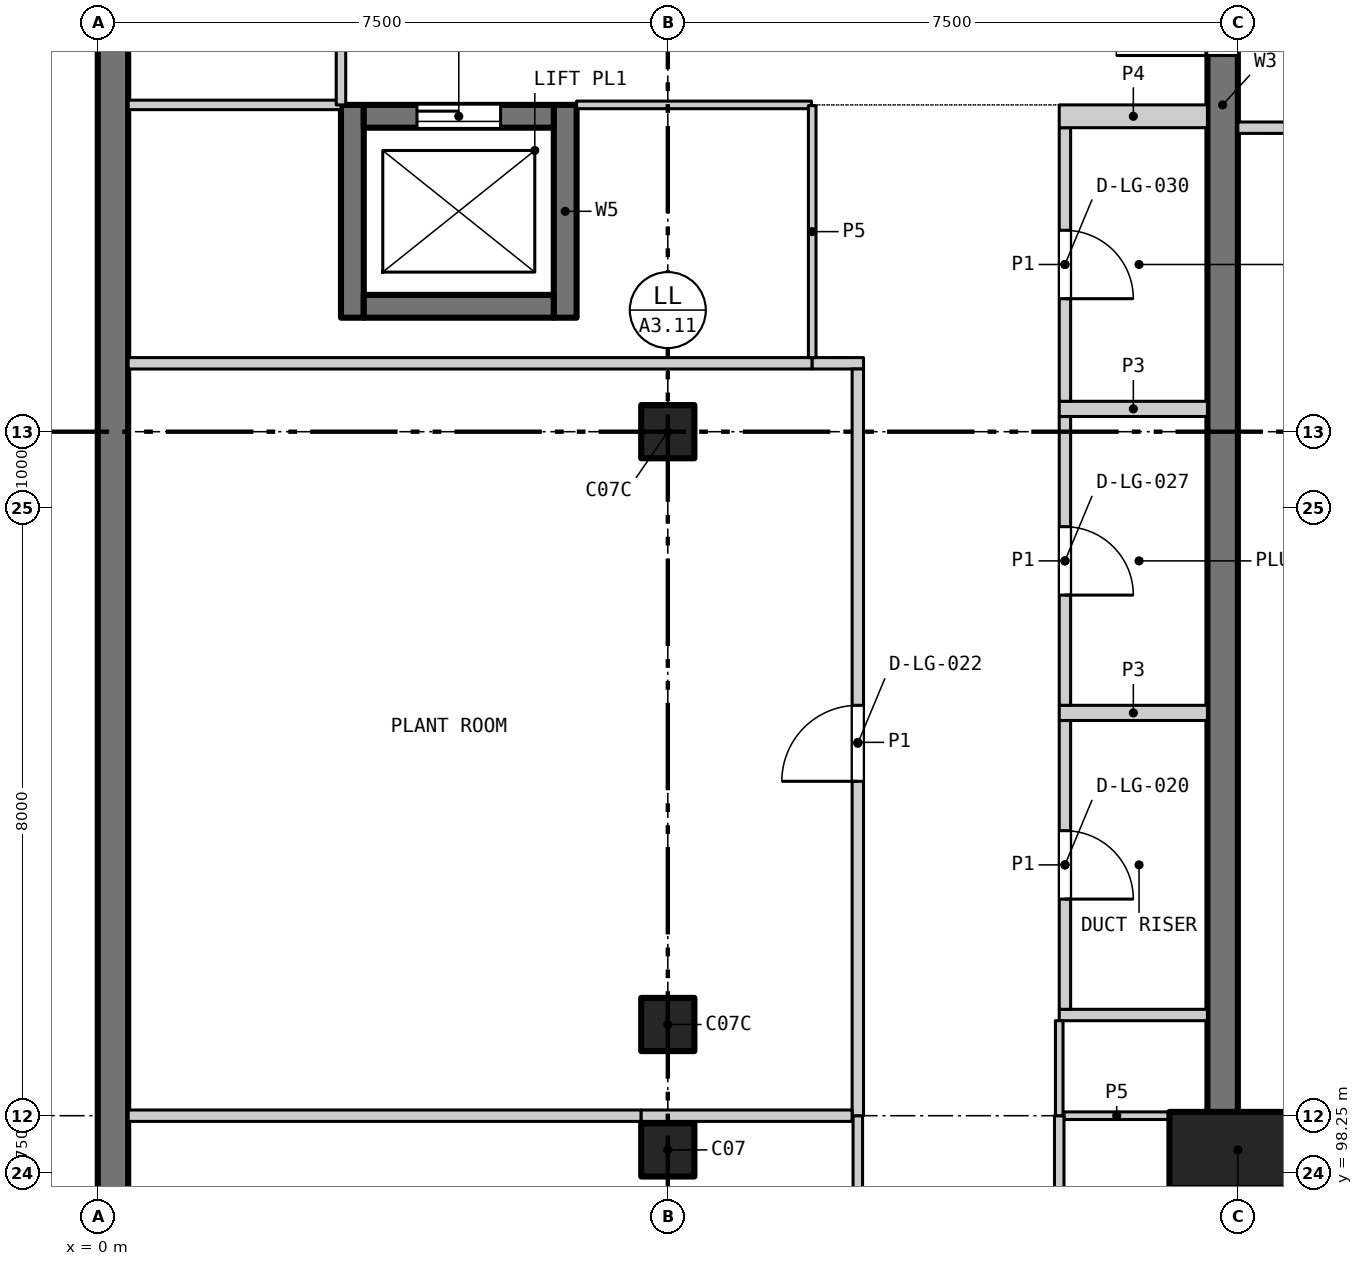
"""IFC4 building model, lengths in metres.
Left out: names, types, materials, properties, quantities, classifications, styles, units other than length and angle.
Written with IfcOpenShell. Run it as: python <this file> out.ifc"""

import sys

from ifc_helpers import new_model, si_unit, direction, frame, frame_2d, origin, origin_2d, place, context, subcontext, project, spatial, rectangle, extrude, element, fill, save


model = new_model("IFC4")
c1 = context("Model", 3, precision=1e-05, world=origin(), true_north=direction((0.0, 1.0)))
c2 = subcontext(c1, "Body", "Model", "MODEL_VIEW")
j1 = project(units=[si_unit("LENGTHUNIT", "METRE"), si_unit("PLANEANGLEUNIT", "RADIAN")], contexts=[c1])
p1 = place(None, origin())
s1 = spatial("IfcSite", under=j1, at=p1, CompositionType="ELEMENT")
p2 = place(p1, origin())
s2 = spatial("IfcBuilding", under=s1, at=p2, CompositionType="ELEMENT")
p3 = place(p2, frame((0.0, 0.0, -5.0)))
s3 = spatial("IfcBuildingStorey", under=s2, at=p3, CompositionType="ELEMENT", Elevation=-5.0)
for number, where, z_axis, x_axis in (
    (1, (7.5, 98.55, 0.0), (0.0, 0.0, 1.0), (1.0, 0.0, 0.0)),
    (2, (7.5, 100.2, 0.0), (0.0, 0.0, 1.0), (1.0, 0.0, 0.0)),
    (3, (7.5, 108.0, 0.0), (0.0, 0.0, 1.0), (1.0, 0.0, 0.0)),
):
    element("IfcColumn", number, at=place(p3, frame(where, z_axis=z_axis, x_axis=x_axis)), inside=s3, PredefinedType="COLUMN", context=c2, shape_type="SweptSolid", body=[
        extrude(rectangle(XDim=0.7, YDim=0.7, at=origin_2d()), origin(), (0.0, 0.0, 1.0), 5.0),
    ])
p4 = place(p3, frame((0.2, 18.0, 0.0), z_axis=(0.0, 0.0, 1.0), x_axis=(0.0, 1.0, 0.0)))
e4 = element("IfcWall", 4, at=p4, inside=s3, PredefinedType="SOLIDWALL", context=c2, shape_type="SweptSolid", body=[
    extrude(rectangle(XDim=108.0, YDim=0.4, at=frame_2d((54.0, 0.0))), origin(), (0.0, 0.0, 1.0), 5.0),
])
p5 = place(p3, frame((14.8, 99.0, 0.0), z_axis=(0.0, 0.0, 1.0), x_axis=(0.0, 1.0, 0.0)))
e5 = element("IfcWall", 5, at=p5, inside=s3, PredefinedType="SHEAR", context=c2, shape_type="SweptSolid", body=[
    extrude(rectangle(XDim=26.6, YDim=0.4, at=frame_2d((13.3, 0.0))), origin(), (0.0, 0.0, 1.0), 5.0),
])
p6 = place(p5, frame((13.95, 0.0, 0.0)))
e6 = element("IfcOpeningElement", 6, at=p6, cuts=e5, PredefinedType="OPENING", context=c2, shape_type="SweptSolid", body=[
    extrude(rectangle(XDim=1.4, YDim=2.4, at=frame_2d((0.7, 1.2))), frame((0.0, 0.21, 0.0), z_axis=(0.0, -1.0, 0.0), x_axis=(1.0, 0.0, 0.0)), (0.0, 0.0, 1.0), 0.42),
])
for number, where, z_axis, x_axis in (
    (7, (3.35, 109.5, 0.0), (0.0, 0.0, 1.0), (0.0, 1.0, 0.0)),
    (8, (6.15, 109.5, 0.0), (0.0, 0.0, 1.0), (0.0, 1.0, 0.0)),
):
    element("IfcWall", number, at=place(p3, frame(where, z_axis=z_axis, x_axis=x_axis)), inside=s3, PredefinedType="SHEAR", context=c2, shape_type="SweptSolid", body=[
        extrude(rectangle(XDim=2.8, YDim=0.3, at=frame_2d((1.4, 0.0))), origin(), (0.0, 0.0, 1.0), 5.0),
    ])
p7 = place(p3, frame((3.5, 109.65, 0.0), z_axis=(0.0, 0.0, 1.0), x_axis=(1.0, 0.0, 0.0)))
e9 = element("IfcWall", 9, at=p7, inside=s3, PredefinedType="SHEAR", context=c2, shape_type="SweptSolid", body=[
    extrude(rectangle(XDim=2.5, YDim=0.3, at=frame_2d((1.25, 0.0))), origin(), (0.0, 0.0, 1.0), 5.0),
])
p8 = place(p3, frame((3.5, 112.15, 0.0), z_axis=(0.0, 0.0, 1.0), x_axis=(1.0, 0.0, 0.0)))
e10 = element("IfcWall", 10, at=p8, inside=s3, PredefinedType="SHEAR", context=c2, shape_type="SweptSolid", body=[
    extrude(rectangle(XDim=2.5, YDim=0.3, at=frame_2d((1.25, 0.0))), origin(), (0.0, 0.0, 1.0), 5.0),
])
p9 = place(p8, frame((0.7, 0.0, 0.0)))
e11 = element("IfcOpeningElement", 11, at=p9, cuts=e10, PredefinedType="OPENING", context=c2, shape_type="SweptSolid", body=[
    extrude(rectangle(XDim=1.1, YDim=2.1, at=frame_2d((0.55, 1.05))), frame((0.0, 0.16, 0.0), z_axis=(0.0, -1.0, 0.0), x_axis=(1.0, 0.0, 0.0)), (0.0, 0.0, 1.0), 0.32),
])
p10 = place(p3, frame((15.0, 98.55, 0.0), z_axis=(0.0, 0.0, 1.0), x_axis=(1.0, 0.0, 0.0)))
e12 = element("IfcColumn", 12, at=p10, inside=s3, PredefinedType="COLUMN", context=c2, shape_type="SweptSolid", body=[
    extrude(rectangle(XDim=1.8, YDim=1.0, at=origin_2d()), origin(), (0.0, 0.0, 1.0), 5.0),
])
p11 = place(p3, frame((12.65, 100.325, 0.0), z_axis=(0.0, 0.0, 1.0), x_axis=(1.0, 0.0, 0.0)))
e13 = element("IfcWall", 13, at=p11, inside=s3, PredefinedType="PARTITIONING", context=c2, shape_type="SweptSolid", body=[
    extrude(rectangle(XDim=1.95, YDim=0.15, at=frame_2d((0.975, 0.0))), origin(), (0.0, 0.0, 1.0), 4.7),
])
p12 = place(p3, frame((12.725, 100.4, 0.0), z_axis=(0.0, 0.0, 1.0), x_axis=(0.0, 1.0, 0.0)))
e14 = element("IfcWall", 14, at=p12, inside=s3, PredefinedType="PARTITIONING", context=c2, shape_type="SweptSolid", body=[
    extrude(rectangle(XDim=3.8, YDim=0.15, at=frame_2d((1.9, 0.0))), origin(), (0.0, 0.0, 1.0), 4.7),
])
p13 = place(p12, frame((1.45, 0.0, 0.0)))
e15 = element("IfcOpeningElement", 15, at=p13, cuts=e14, PredefinedType="OPENING", context=c2, shape_type="SweptSolid", body=[
    extrude(rectangle(XDim=0.9, YDim=2.1, at=frame_2d((0.45, 1.05))), frame((0.0, 0.085, 0.0), z_axis=(0.0, -1.0, 0.0), x_axis=(1.0, 0.0, 0.0)), (0.0, 0.0, 1.0), 0.17),
])
p14 = place(p3, frame((12.65, 104.3, 0.0), z_axis=(0.0, 0.0, 1.0), x_axis=(1.0, 0.0, 0.0)))
e16 = element("IfcWall", 16, at=p14, inside=s3, PredefinedType="PARTITIONING", context=c2, shape_type="SweptSolid", body=[
    extrude(rectangle(XDim=1.95, YDim=0.2, at=frame_2d((0.975, 0.0))), origin(), (0.0, 0.0, 1.0), 4.7),
])
p15 = place(p3, frame((12.725, 104.4, 0.0), z_axis=(0.0, 0.0, 1.0), x_axis=(0.0, 1.0, 0.0)))
e17 = element("IfcWall", 17, at=p15, inside=s3, PredefinedType="PARTITIONING", context=c2, shape_type="SweptSolid", body=[
    extrude(rectangle(XDim=3.8, YDim=0.15, at=frame_2d((1.9, 0.0))), origin(), (0.0, 0.0, 1.0), 4.7),
])
p16 = place(p15, frame((1.45, 0.0, 0.0)))
e18 = element("IfcOpeningElement", 18, at=p16, cuts=e17, PredefinedType="OPENING", context=c2, shape_type="SweptSolid", body=[
    extrude(rectangle(XDim=0.9, YDim=2.1, at=frame_2d((0.45, 1.05))), frame((0.0, 0.085, 0.0), z_axis=(0.0, -1.0, 0.0), x_axis=(1.0, 0.0, 0.0)), (0.0, 0.0, 1.0), 0.17),
])
p17 = place(p3, frame((12.65, 108.3, 0.0), z_axis=(0.0, 0.0, 1.0), x_axis=(1.0, 0.0, 0.0)))
e19 = element("IfcWall", 19, at=p17, inside=s3, PredefinedType="PARTITIONING", context=c2, shape_type="SweptSolid", body=[
    extrude(rectangle(XDim=1.95, YDim=0.2, at=frame_2d((0.975, 0.0))), origin(), (0.0, 0.0, 1.0), 4.7),
])
p18 = place(p3, frame((12.725, 108.4, 0.0), z_axis=(0.0, 0.0, 1.0), x_axis=(0.0, 1.0, 0.0)))
e20 = element("IfcWall", 20, at=p18, inside=s3, PredefinedType="PARTITIONING", context=c2, shape_type="SweptSolid", body=[
    extrude(rectangle(XDim=3.6, YDim=0.15, at=frame_2d((1.8, 0.0))), origin(), (0.0, 0.0, 1.0), 4.7),
])
p19 = place(p18, frame((1.35, 0.0, 0.0)))
e21 = element("IfcOpeningElement", 21, at=p19, cuts=e20, PredefinedType="OPENING", context=c2, shape_type="SweptSolid", body=[
    extrude(rectangle(XDim=0.9, YDim=2.1, at=frame_2d((0.45, 1.05))), frame((0.0, 0.085, 0.0), z_axis=(0.0, -1.0, 0.0), x_axis=(1.0, 0.0, 0.0)), (0.0, 0.0, 1.0), 0.17),
])
p20 = place(p3, frame((12.65, 112.15, 0.0), z_axis=(0.0, 0.0, 1.0), x_axis=(1.0, 0.0, 0.0)))
e22 = element("IfcWall", 22, at=p20, inside=s3, PredefinedType="PARTITIONING", context=c2, shape_type="SweptSolid", body=[
    extrude(rectangle(XDim=1.95, YDim=0.3, at=frame_2d((0.975, 0.0))), origin(), (0.0, 0.0, 1.0), 4.7),
])
p21 = place(p3, frame((0.4, 99.0, 0.0), z_axis=(0.0, 0.0, 1.0), x_axis=(1.0, 0.0, 0.0)))
e23 = element("IfcWall", 23, at=p21, inside=s3, PredefinedType="PARTITIONING", context=c2, shape_type="SweptSolid", body=[
    extrude(rectangle(XDim=6.75, YDim=0.15, at=frame_2d((3.375, 0.0))), origin(), (0.0, 0.0, 1.0), 4.1),
])
p22 = place(p3, frame((12.712, 99.0, 0.0), z_axis=(0.0, 0.0, 1.0), x_axis=(1.0, 0.0, 0.0)))
e24 = element("IfcWall", 24, at=p22, inside=s3, PredefinedType="PARTITIONING", context=c2, shape_type="SweptSolid", body=[
    extrude(rectangle(XDim=1.388, YDim=0.1, at=frame_2d((0.694, 0.0))), origin(), (0.0, 0.0, 1.0), 4.65),
])
p23 = place(p3, frame((0.4, 108.9, 0.0), z_axis=(0.0, 0.0, 1.0), x_axis=(1.0, 0.0, 0.0)))
e25 = element("IfcWall", 25, at=p23, inside=s3, PredefinedType="PARTITIONING", context=c2, shape_type="SweptSolid", body=[
    extrude(rectangle(XDim=9.0, YDim=0.15, at=frame_2d((4.5, 0.0))), origin(), (0.0, 0.0, 1.0), 4.7),
])
p24 = place(p3, frame((9.4, 108.9, 0.0), z_axis=(0.0, 0.0, 1.0), x_axis=(1.0, 0.0, 0.0)))
e26 = element("IfcWall", 26, at=p24, inside=s3, PredefinedType="PARTITIONING", context=c2, shape_type="SweptSolid", body=[
    extrude(rectangle(XDim=0.675, YDim=0.15, at=frame_2d((0.337, 0.0))), origin(), (0.0, 0.0, 1.0), 4.7),
])
p25 = place(p3, frame((15.0, 112.0, 0.0), z_axis=(0.0, 0.0, 1.0), x_axis=(1.0, 0.0, 0.0)))
e27 = element("IfcWall", 27, at=p25, inside=s3, PredefinedType="PARTITIONING", context=c2, shape_type="SweptSolid", body=[
    extrude(rectangle(XDim=14.99, YDim=0.15, at=frame_2d((7.495, 0.0))), origin(), (0.0, 0.0, 1.0), 4.7),
])
p26 = place(p3, frame((0.4, 112.3, 0.0), z_axis=(0.0, 0.0, 1.0), x_axis=(1.0, 0.0, 0.0)))
e28 = element("IfcWall", 28, at=p26, inside=s3, PredefinedType="PARTITIONING", context=c2, shape_type="SweptSolid", body=[
    extrude(rectangle(XDim=2.8, YDim=0.125, at=frame_2d((1.4, 0.0))), origin(), (0.0, 0.0, 1.0), 4.7),
])
p27 = place(p3, frame((6.3, 112.3, 0.0), z_axis=(0.0, 0.0, 1.0), x_axis=(1.0, 0.0, 0.0)))
e29 = element("IfcWall", 29, at=p27, inside=s3, PredefinedType="PARTITIONING", context=c2, shape_type="SweptSolid", body=[
    extrude(rectangle(XDim=3.09, YDim=0.1, at=frame_2d((1.545, 0.0))), origin(), (0.0, 0.0, 1.0), 4.7),
])
p28 = place(p3, frame((3.2, 112.3, 0.0), z_axis=(0.0, 0.0, 1.0), x_axis=(0.0, 1.0, 0.0)))
e30 = element("IfcWall", 30, at=p28, inside=s3, PredefinedType="PARTITIONING", context=c2, shape_type="SweptSolid", body=[
    extrude(rectangle(XDim=5.75, YDim=0.125, at=frame_2d((2.875, 0.0))), origin(), (0.0, 0.0, 1.0), 4.7),
])
p29 = place(p28, frame((2.35, 0.0, 0.0)))
e31 = element("IfcOpeningElement", 31, at=p29, cuts=e30, PredefinedType="OPENING", context=c2, shape_type="SweptSolid", body=[
    extrude(rectangle(XDim=1.1, YDim=2.1, at=frame_2d((0.55, 1.05))), frame((0.0, 0.073, 0.0), z_axis=(0.0, -1.0, 0.0), x_axis=(1.0, 0.0, 0.0)), (0.0, 0.0, 1.0), 0.145),
])
p30 = place(p3, frame((9.4, 108.975, 0.0), z_axis=(0.0, 0.0, 1.0), x_axis=(0.0, 1.0, 0.0)))
e32 = element("IfcWall", 32, at=p30, inside=s3, PredefinedType="PARTITIONING", context=c2, shape_type="SweptSolid", body=[
    extrude(rectangle(XDim=3.315, YDim=0.1, at=frame_2d((1.657, 0.0))), origin(), (0.0, 0.0, 1.0), 4.7),
])
p31 = place(p3, frame((10.0, 81.5, 0.0), z_axis=(0.0, 0.0, 1.0), x_axis=(0.0, 1.0, 0.0)))
e33 = element("IfcWall", 33, at=p31, inside=s3, PredefinedType="PARTITIONING", context=c2, shape_type="SweptSolid", body=[
    extrude(rectangle(XDim=17.5, YDim=0.125, at=frame_2d((8.75, 0.0))), origin(), (0.0, 0.0, 1.0), 4.7),
])
p32 = place(p31, frame((8.25, 0.0, 0.0)))
e34 = element("IfcOpeningElement", 34, at=p32, cuts=e33, PredefinedType="OPENING", context=c2, shape_type="SweptSolid", body=[
    extrude(rectangle(XDim=1.0, YDim=2.1, at=frame_2d((0.5, 1.05))), frame((0.0, 0.073, 0.0), z_axis=(0.0, -1.0, 0.0), x_axis=(1.0, 0.0, 0.0)), (0.0, 0.0, 1.0), 0.145),
])
p33 = place(p3, frame((10.0, 99.0, 0.0), z_axis=(0.0, 0.0, 1.0), x_axis=(0.0, 1.0, 0.0)))
e35 = element("IfcWall", 35, at=p33, inside=s3, PredefinedType="PARTITIONING", context=c2, shape_type="SweptSolid", body=[
    extrude(rectangle(XDim=9.825, YDim=0.15, at=frame_2d((4.913, 0.0))), origin(), (0.0, 0.0, 1.0), 4.7),
])
p34 = place(p33, frame((4.4, 0.0, 0.0)))
e36 = element("IfcOpeningElement", 36, at=p34, cuts=e35, PredefinedType="OPENING", context=c2, shape_type="SweptSolid", body=[
    extrude(rectangle(XDim=1.0, YDim=2.1, at=frame_2d((0.5, 1.05))), frame((0.0, 0.085, 0.0), z_axis=(0.0, -1.0, 0.0), x_axis=(1.0, 0.0, 0.0)), (0.0, 0.0, 1.0), 0.17),
])
p35 = place(p3, frame((12.65, 84.0, 0.0), z_axis=(0.0, 0.0, 1.0), x_axis=(0.0, 1.0, 0.0)))
e37 = element("IfcWall", 37, at=p35, inside=s3, PredefinedType="PARTITIONING", context=c2, shape_type="SweptSolid", body=[
    extrude(rectangle(XDim=15.0, YDim=0.125, at=frame_2d((7.5, 0.0))), origin(), (0.0, 0.0, 1.0), 4.65),
])
p36 = place(p35, frame((7.0, 0.0, 0.0)))
e38 = element("IfcOpeningElement", 38, at=p36, cuts=e37, PredefinedType="OPENING", context=c2, shape_type="SweptSolid", body=[
    extrude(rectangle(XDim=1.0, YDim=2.1, at=frame_2d((0.5, 1.05))), frame((0.0, 0.073, 0.0), z_axis=(0.0, -1.0, 0.0), x_axis=(1.0, 0.0, 0.0)), (0.0, 0.0, 1.0), 0.145),
])
p37 = place(p3, frame((12.65, 99.0, 0.0), z_axis=(0.0, 0.0, 1.0), x_axis=(0.0, 1.0, 0.0)))
e39 = element("IfcWall", 39, at=p37, inside=s3, PredefinedType="PARTITIONING", context=c2, shape_type="SweptSolid", body=[
    extrude(rectangle(XDim=1.25, YDim=0.1, at=frame_2d((0.625, 0.0))), origin(), (0.0, 0.0, 1.0), 4.7),
])
p38 = place(p3, frame((7.15, 99.0, 0.0), z_axis=(0.0, 0.0, 1.0), x_axis=(1.0, 0.0, 0.0)))
e40 = element("IfcWall", 40, at=p38, inside=s3, PredefinedType="PARTITIONING", context=c2, shape_type="SweptSolid", body=[
    extrude(rectangle(XDim=2.775, YDim=0.15, at=frame_2d((1.388, 0.0))), origin(), (0.0, 0.0, 1.0), 4.7),
])
p39 = place(p13, frame((0.9, 0.0, 0.0), z_axis=(0.0, 0.0, 1.0), x_axis=(-1.0, 0.0, 0.0)))
e41 = element("IfcDoor", 41, at=p39, inside=s3, OperationType="SINGLE_SWING_RIGHT", PredefinedType="DOOR", context=c2, shape_type="SweptSolid", body=[
    extrude(rectangle(XDim=0.9, YDim=2.1, at=frame_2d((0.45, 1.05))), frame((0.0, 0.025, 0.0), z_axis=(0.0, -1.0, 0.0), x_axis=(1.0, 0.0, 0.0)), (0.0, 0.0, 1.0), 0.05),
])
fill(e15, e41)
p40 = place(p34, origin())
e42 = element("IfcDoor", 42, at=p40, inside=s3, OperationType="SINGLE_SWING_LEFT", PredefinedType="DOOR", context=c2, shape_type="SweptSolid", body=[
    extrude(rectangle(XDim=1.0, YDim=2.1, at=frame_2d((0.5, 1.05))), frame((0.0, 0.025, 0.0), z_axis=(0.0, -1.0, 0.0), x_axis=(1.0, 0.0, 0.0)), (0.0, 0.0, 1.0), 0.05),
])
fill(e36, e42)
p41 = place(p16, frame((0.9, 0.0, 0.0), z_axis=(0.0, 0.0, 1.0), x_axis=(-1.0, 0.0, 0.0)))
e43 = element("IfcDoor", 43, at=p41, inside=s3, OperationType="SINGLE_SWING_RIGHT", PredefinedType="DOOR", context=c2, shape_type="SweptSolid", body=[
    extrude(rectangle(XDim=0.9, YDim=2.1, at=frame_2d((0.45, 1.05))), frame((0.0, 0.025, 0.0), z_axis=(0.0, -1.0, 0.0), x_axis=(1.0, 0.0, 0.0)), (0.0, 0.0, 1.0), 0.05),
])
fill(e18, e43)
p42 = place(p19, frame((0.9, 0.0, 0.0), z_axis=(0.0, 0.0, 1.0), x_axis=(-1.0, 0.0, 0.0)))
e44 = element("IfcDoor", 44, at=p42, inside=s3, OperationType="SINGLE_SWING_RIGHT", PredefinedType="DOOR", context=c2, shape_type="SweptSolid", body=[
    extrude(rectangle(XDim=0.9, YDim=2.1, at=frame_2d((0.45, 1.05))), frame((0.0, 0.025, 0.0), z_axis=(0.0, -1.0, 0.0), x_axis=(1.0, 0.0, 0.0)), (0.0, 0.0, 1.0), 0.05),
])
fill(e21, e44)
p43 = place(p6, origin())
e45 = element("IfcDoor", 45, at=p43, inside=s3, OperationType="SINGLE_SWING_LEFT", PredefinedType="DOOR", context=c2, shape_type="SweptSolid", body=[
    extrude(rectangle(XDim=1.4, YDim=2.4, at=frame_2d((0.7, 1.2))), frame((0.0, 0.025, 0.0), z_axis=(0.0, -1.0, 0.0), x_axis=(1.0, 0.0, 0.0)), (0.0, 0.0, 1.0), 0.05),
])
fill(e6, e45)
p44 = place(p9, origin())
e46 = element("IfcDoor", 46, at=p44, inside=s3, OperationType="SLIDING_TO_LEFT", PredefinedType="DOOR", context=c2, shape_type="SweptSolid", body=[
    extrude(rectangle(XDim=1.1, YDim=2.1, at=frame_2d((0.55, 1.05))), frame((0.0, 0.025, 0.0), z_axis=(0.0, -1.0, 0.0), x_axis=(1.0, 0.0, 0.0)), (0.0, 0.0, 1.0), 0.05),
])
fill(e11, e46)
save(model, sys.argv[1])
